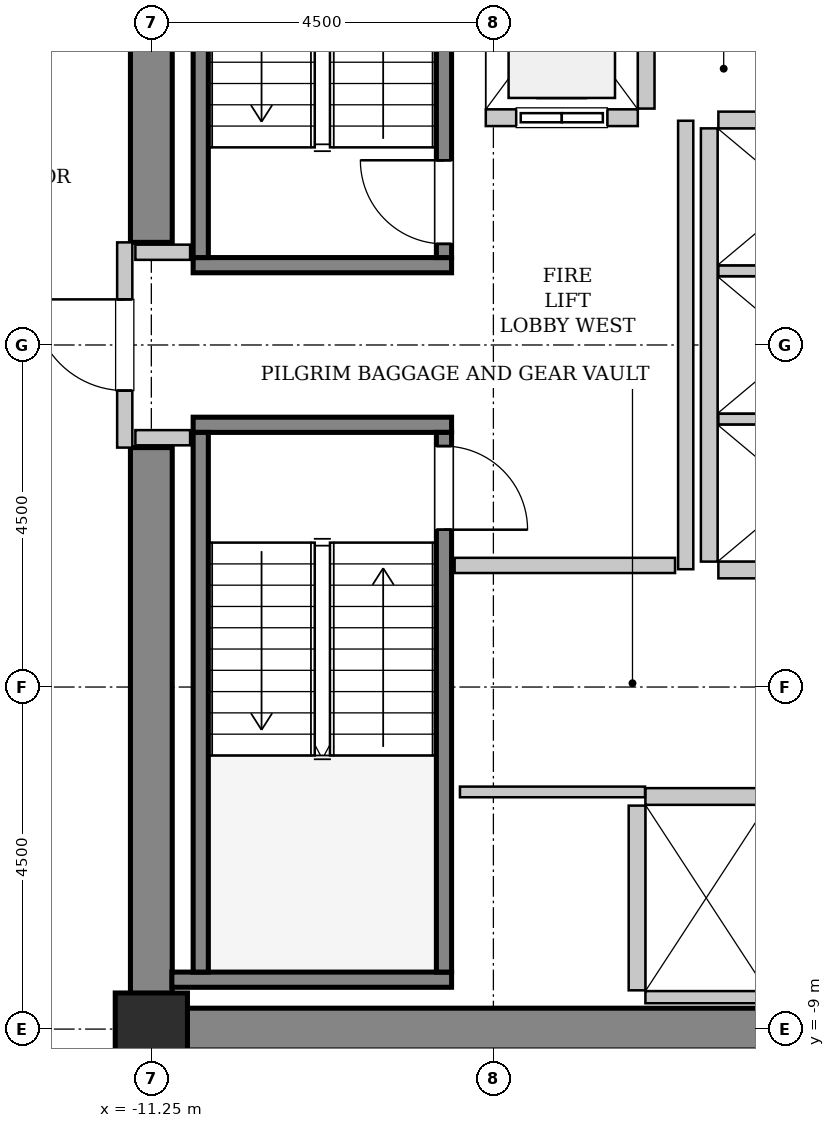
"""IFC4 building model, lengths in metres.
Left out: names, types, materials, properties, quantities, classifications, styles, units other than length and angle.
Written with IfcOpenShell. Run it as: python <this file> out.ifc"""

import sys

from ifc_helpers import new_model, si_unit, direction, frame, frame_2d, origin, origin_2d, place, context, subcontext, project, spatial, rectangle, hollow_rectangle, extrude, source, transform, mapped, element, fill, save


model = new_model("IFC4")
c1 = context("Model", 3, precision=1e-05, world=origin(), true_north=direction((0.0, 1.0)))
c2 = subcontext(c1, "Body", "Model", "MODEL_VIEW")
j1 = project(units=[si_unit("LENGTHUNIT", "METRE"), si_unit("PLANEANGLEUNIT", "RADIAN")], contexts=[c1])
p1 = place(None, origin())
s1 = spatial("IfcSite", under=j1, at=p1, CompositionType="ELEMENT")
p2 = place(p1, origin())
s2 = spatial("IfcBuilding", under=s1, at=p2, CompositionType="ELEMENT")
p3 = place(p2, frame((0.0, 0.0, 132.6)))
s3 = spatial("IfcBuildingStorey", under=s2, at=p3, CompositionType="ELEMENT", Elevation=132.6)
m1 = source(origin(), c2, "Body", "SweptSolid", [
    extrude(rectangle(XDim=9.975, YDim=0.55, at=frame_2d((4.987, 0.0))), origin(), (0.0, 0.0, 1.0), 3.8),
])
p4 = place(p3, frame((-11.525, -9.0, 0.0), z_axis=(0.0, 0.0, 1.0), x_axis=(1.0, 0.0, 0.0)))
e1 = element("IfcWall", 1, at=p4, inside=s3, PredefinedType="SHEAR", context=c2, shape_type="MappedRepresentation", body=[
    mapped(m1, transform((0.0, 0.0, 0.0), x_axis=(1.0, 0.0, 0.0), y_axis=(0.0, 1.0, 0.0), z_axis=(0.0, 0.0, 1.0), scale=1.0)),
])
m2 = source(origin(), c2, "Body", "SweptSolid", [
    extrude(rectangle(XDim=7.375, YDim=0.55, at=frame_2d((3.688, 0.0))), origin(), (0.0, 0.0, 1.0), 3.8),
])
for number, where, z_axis, x_axis in (
    (2, (-11.25, -8.725, 0.0), (0.0, 0.0, 1.0), (0.0, 1.0, 0.0)),
    (3, (-11.25, 1.35, 0.0), (0.0, 0.0, 1.0), (0.0, 1.0, 0.0)),
):
    element("IfcWall", number, at=place(p3, frame(where, z_axis=z_axis, x_axis=x_axis)), inside=s3, PredefinedType="SHEAR", context=c2, shape_type="MappedRepresentation", body=[
        mapped(m2, transform((0.0, 0.0, 0.0), x_axis=(1.0, 0.0, 0.0), y_axis=(0.0, 1.0, 0.0), z_axis=(0.0, 0.0, 1.0), scale=1.0)),
    ])
m3 = source(origin(), c2, "Body", "SweptSolid", [
    extrude(hollow_rectangle(XDim=0.95, YDim=0.95, WallThickness=0.045, InnerFilletRadius=0.045, OuterFilletRadius=0.09, at=origin_2d()), origin(), (0.0, 0.0, 1.0), 3.8),
])
p5 = place(p3, frame((-11.25, -9.0, 0.0), z_axis=(0.0, 0.0, 1.0), x_axis=(1.0, 0.0, 0.0)))
e4 = element("IfcColumn", 4, at=p5, inside=s3, PredefinedType="COLUMN", context=c2, shape_type="MappedRepresentation", body=[
    mapped(m3, transform((0.0, 0.0, 0.0), x_axis=(1.0, 0.0, 0.0), y_axis=(0.0, 1.0, 0.0), z_axis=(0.0, 0.0, 1.0), scale=1.0)),
])
m4 = source(origin(), c2, "Body", "SweptSolid", [
    extrude(rectangle(XDim=3.4, YDim=0.2, at=frame_2d((1.7, 0.0))), origin(), (0.0, 0.0, 1.0), 3.8),
])
p6 = place(p3, frame((-7.3, 1.05, 0.0), z_axis=(0.0, 0.0, 1.0), x_axis=(-1.0, 0.0, 0.0)))
e5 = element("IfcWall", 5, at=p6, inside=s3, PredefinedType="SOLIDWALL", context=c2, shape_type="MappedRepresentation", body=[
    mapped(m4, transform((0.0, 0.0, 0.0), x_axis=(1.0, 0.0, 0.0), y_axis=(0.0, 1.0, 0.0), z_axis=(0.0, 0.0, 1.0), scale=1.0)),
])
m5 = source(origin(), c2, "Body", "SweptSolid", [
    extrude(rectangle(XDim=7.1, YDim=0.2, at=frame_2d((3.55, 0.0))), origin(), (0.0, 0.0, 1.0), 3.8),
])
p7 = place(p3, frame((-7.4, 1.15, 0.0), z_axis=(0.0, 0.0, 1.0), x_axis=(0.0, 1.0, 0.0)))
e6 = element("IfcWall", 6, at=p7, inside=s3, PredefinedType="SOLIDWALL", context=c2, shape_type="MappedRepresentation", body=[
    mapped(m5, transform((0.0, 0.0, 0.0), x_axis=(1.0, 0.0, 0.0), y_axis=(0.0, 1.0, 0.0), z_axis=(0.0, 0.0, 1.0), scale=1.0)),
])
p8 = place(p7, frame((0.18, 0.0, 0.0)))
e7 = element("IfcOpeningElement", 7, at=p8, cuts=e6, PredefinedType="OPENING", context=c2, shape_type="SweptSolid", body=[
    extrude(rectangle(XDim=1.1, YDim=2.15, at=frame_2d((0.55, 1.075))), frame((0.0, 0.11, 0.0), z_axis=(0.0, -1.0, 0.0), x_axis=(1.0, 0.0, 0.0)), (0.0, 0.0, 1.0), 0.22),
])
p9 = place(p3, frame((-10.6, 1.15, 0.0), z_axis=(0.0, 0.0, 1.0), x_axis=(0.0, 1.0, 0.0)))
e8 = element("IfcWall", 8, at=p9, inside=s3, PredefinedType="SOLIDWALL", context=c2, shape_type="MappedRepresentation", body=[
    mapped(m5, transform((0.0, 0.0, 0.0), x_axis=(1.0, 0.0, 0.0), y_axis=(0.0, 1.0, 0.0), z_axis=(0.0, 0.0, 1.0), scale=1.0)),
])
p10 = place(p3, frame((-10.7, -1.05, 0.0), z_axis=(0.0, 0.0, 1.0), x_axis=(1.0, 0.0, 0.0)))
e9 = element("IfcWall", 9, at=p10, inside=s3, PredefinedType="SOLIDWALL", context=c2, shape_type="MappedRepresentation", body=[
    mapped(m4, transform((0.0, 0.0, 0.0), x_axis=(1.0, 0.0, 0.0), y_axis=(0.0, 1.0, 0.0), z_axis=(0.0, 0.0, 1.0), scale=1.0)),
])
m6 = source(origin(), c2, "Body", "SweptSolid", [
    extrude(rectangle(XDim=3.68, YDim=0.2, at=frame_2d((1.84, 0.0))), origin(), (0.0, 0.0, 1.0), 3.8),
])
p11 = place(p3, frame((-10.98, -8.35, 0.0), z_axis=(0.0, 0.0, 1.0), x_axis=(1.0, 0.0, 0.0)))
e10 = element("IfcWall", 10, at=p11, inside=s3, PredefinedType="SOLIDWALL", context=c2, shape_type="MappedRepresentation", body=[
    mapped(m6, transform((0.0, 0.0, 0.0), x_axis=(1.0, 0.0, 0.0), y_axis=(0.0, 1.0, 0.0), z_axis=(0.0, 0.0, 1.0), scale=1.0)),
])
p12 = place(p3, frame((-10.6, -1.15, 0.0), z_axis=(0.0, 0.0, 1.0), x_axis=(0.0, -1.0, 0.0)))
e11 = element("IfcWall", 11, at=p12, inside=s3, PredefinedType="SOLIDWALL", context=c2, shape_type="MappedRepresentation", body=[
    mapped(m5, transform((0.0, 0.0, 0.0), x_axis=(1.0, 0.0, 0.0), y_axis=(0.0, 1.0, 0.0), z_axis=(0.0, 0.0, 1.0), scale=1.0)),
])
p13 = place(p3, frame((-7.4, -1.15, 0.0), z_axis=(0.0, 0.0, 1.0), x_axis=(0.0, -1.0, 0.0)))
e12 = element("IfcWall", 12, at=p13, inside=s3, PredefinedType="SOLIDWALL", context=c2, shape_type="MappedRepresentation", body=[
    mapped(m5, transform((0.0, 0.0, 0.0), x_axis=(1.0, 0.0, 0.0), y_axis=(0.0, 1.0, 0.0), z_axis=(0.0, 0.0, 1.0), scale=1.0)),
])
p14 = place(p13, frame((0.18, 0.0, 0.0)))
e13 = element("IfcOpeningElement", 13, at=p14, cuts=e12, PredefinedType="OPENING", context=c2, shape_type="SweptSolid", body=[
    extrude(rectangle(XDim=1.1, YDim=2.15, at=frame_2d((0.55, 1.075))), frame((0.0, 0.11, 0.0), z_axis=(0.0, -1.0, 0.0), x_axis=(1.0, 0.0, 0.0)), (0.0, 0.0, 1.0), 0.22),
])
m7 = source(origin(), c2, "Body", "SweptSolid", [
    extrude(rectangle(XDim=2.0, YDim=0.22, at=frame_2d((1.0, 0.0))), origin(), (0.0, 0.0, 1.0), 3.535),
])
p15 = place(p3, frame((-6.85, 2.99, 0.0), z_axis=(0.0, 0.0, 1.0), x_axis=(1.0, 0.0, 0.0)))
e14 = element("IfcWall", 14, at=p15, inside=s3, PredefinedType="SOLIDWALL", context=c2, shape_type="MappedRepresentation", body=[
    mapped(m7, transform((0.0, 0.0, 0.0), x_axis=(1.0, 0.0, 0.0), y_axis=(0.0, 1.0, 0.0), z_axis=(0.0, 0.0, 1.0), scale=1.0)),
])
p16 = place(p15, frame((0.4, 0.0, 0.0)))
e15 = element("IfcOpeningElement", 15, at=p16, cuts=e14, PredefinedType="OPENING", context=c2, shape_type="SweptSolid", body=[
    extrude(rectangle(XDim=1.2, YDim=2.2, at=frame_2d((0.6, 1.1))), frame((0.0, 0.12, 0.0), z_axis=(0.0, -1.0, 0.0), x_axis=(1.0, 0.0, 0.0)), (0.0, 0.0, 1.0), 0.24),
])
m8 = source(origin(), c2, "Body", "SweptSolid", [
    extrude(rectangle(XDim=2.68, YDim=0.22, at=frame_2d((1.34, 0.0))), origin(), (0.0, 0.0, 1.0), 3.535),
])
p17 = place(p3, frame((-4.74, 3.11, 0.0), z_axis=(0.0, 0.0, 1.0), x_axis=(0.0, 1.0, 0.0)))
e16 = element("IfcWall", 16, at=p17, inside=s3, PredefinedType="SOLIDWALL", context=c2, shape_type="MappedRepresentation", body=[
    mapped(m8, transform((0.0, 0.0, 0.0), x_axis=(1.0, 0.0, 0.0), y_axis=(0.0, 1.0, 0.0), z_axis=(0.0, 0.0, 1.0), scale=1.0)),
])
m9 = source(origin(), c2, "Body", "SweptSolid", [
    extrude(rectangle(XDim=3.2, YDim=0.22, at=frame_2d((1.6, 0.0))), origin(), (0.0, 0.0, 1.0), 3.535),
])
p18 = place(p3, frame((-1.55, -5.94, 0.0), z_axis=(0.0, 0.0, 1.0), x_axis=(-1.0, 0.0, 0.0)))
e17 = element("IfcWall", 17, at=p18, inside=s3, PredefinedType="SOLIDWALL", context=c2, shape_type="MappedRepresentation", body=[
    mapped(m9, transform((0.0, 0.0, 0.0), x_axis=(1.0, 0.0, 0.0), y_axis=(0.0, 1.0, 0.0), z_axis=(0.0, 0.0, 1.0), scale=1.0)),
])
m10 = source(origin(), c2, "Body", "SweptSolid", [
    extrude(rectangle(XDim=3.2, YDim=0.16, at=frame_2d((1.6, 0.0))), origin(), (0.0, 0.0, 1.0), 2.425),
])
p19 = place(p3, frame((-4.75, -8.58, 0.0), z_axis=(0.0, 0.0, 1.0), x_axis=(1.0, 0.0, 0.0)))
e18 = element("IfcWall", 18, at=p19, inside=s3, PredefinedType="PARTITIONING", context=c2, shape_type="MappedRepresentation", body=[
    mapped(m10, transform((0.0, 0.0, 0.0), x_axis=(1.0, 0.0, 0.0), y_axis=(0.0, 1.0, 0.0), z_axis=(0.0, 0.0, 1.0), scale=1.0)),
])
m11 = source(origin(), c2, "Body", "SweptSolid", [
    extrude(rectangle(XDim=2.43, YDim=0.22, at=frame_2d((1.215, 0.0))), origin(), (0.0, 0.0, 1.0), 3.535),
])
p20 = place(p3, frame((-4.86, -6.06, 0.0), z_axis=(0.0, 0.0, 1.0), x_axis=(0.0, -1.0, 0.0)))
e19 = element("IfcWall", 19, at=p20, inside=s3, PredefinedType="SOLIDWALL", context=c2, shape_type="MappedRepresentation", body=[
    mapped(m11, transform((0.0, 0.0, 0.0), x_axis=(1.0, 0.0, 0.0), y_axis=(0.0, 1.0, 0.0), z_axis=(0.0, 0.0, 1.0), scale=1.0)),
])
m12 = source(origin(), c2, "Body", "SweptSolid", [
    extrude(rectangle(XDim=5.7, YDim=0.22, at=frame_2d((2.85, 0.0))), origin(), (0.0, 0.0, 1.0), 3.535),
])
p21 = place(p3, frame((-3.91, 2.85, 0.0), z_axis=(0.0, 0.0, 1.0), x_axis=(0.0, -1.0, 0.0)))
e20 = element("IfcWall", 20, at=p21, inside=s3, PredefinedType="SOLIDWALL", context=c2, shape_type="MappedRepresentation", body=[
    mapped(m12, transform((0.0, 0.0, 0.0), x_axis=(1.0, 0.0, 0.0), y_axis=(0.0, 1.0, 0.0), z_axis=(0.0, 0.0, 1.0), scale=1.0)),
])
m13 = source(origin(), c2, "Body", "SweptSolid", [
    extrude(rectangle(XDim=2.13, YDim=0.22, at=frame_2d((1.065, 0.0))), origin(), (0.0, 0.0, 1.0), 3.535),
])
p22 = place(p3, frame((-3.79, -2.96, 0.0), z_axis=(0.0, 0.0, 1.0), x_axis=(1.0, 0.0, 0.0)))
e21 = element("IfcWall", 21, at=p22, inside=s3, PredefinedType="SOLIDWALL", context=c2, shape_type="MappedRepresentation", body=[
    mapped(m13, transform((0.0, 0.0, 0.0), x_axis=(1.0, 0.0, 0.0), y_axis=(0.0, 1.0, 0.0), z_axis=(0.0, 0.0, 1.0), scale=1.0)),
])
m14 = source(origin(), c2, "Body", "SweptSolid", [
    extrude(rectangle(XDim=2.13, YDim=0.14, at=frame_2d((1.065, 0.0))), origin(), (0.0, 0.0, 1.0), 3.535),
])
for number, where, z_axis, x_axis in (
    (22, (-3.79, -0.975, 0.0), (0.0, 0.0, 1.0), (1.0, 0.0, 0.0)),
    (23, (-3.79, 0.975, 0.0), (0.0, 0.0, 1.0), (1.0, 0.0, 0.0)),
):
    element("IfcWall", number, at=place(p3, frame(where, z_axis=z_axis, x_axis=x_axis)), inside=s3, PredefinedType="PARTITIONING", context=c2, shape_type="MappedRepresentation", body=[
        mapped(m14, transform((0.0, 0.0, 0.0), x_axis=(1.0, 0.0, 0.0), y_axis=(0.0, 1.0, 0.0), z_axis=(0.0, 0.0, 1.0), scale=1.0)),
    ])
p23 = place(p3, frame((-1.66, 2.96, 0.0), z_axis=(0.0, 0.0, 1.0), x_axis=(-1.0, 0.0, 0.0)))
e24 = element("IfcWall", 24, at=p23, inside=s3, PredefinedType="SOLIDWALL", context=c2, shape_type="MappedRepresentation", body=[
    mapped(m13, transform((0.0, 0.0, 0.0), x_axis=(1.0, 0.0, 0.0), y_axis=(0.0, 1.0, 0.0), z_axis=(0.0, 0.0, 1.0), scale=1.0)),
])
m15 = source(origin(), c2, "Body", "SweptSolid", [
    extrude(rectangle(XDim=2.7, YDim=0.2, at=frame_2d((1.35, 0.0))), origin(), (0.0, 0.0, 1.0), 2.425),
])
p24 = place(p3, frame((-11.6, -1.35, 0.0), z_axis=(0.0, 0.0, 1.0), x_axis=(0.0, 1.0, 0.0)))
e25 = element("IfcWall", 25, at=p24, inside=s3, PredefinedType="PARTITIONING", context=c2, shape_type="MappedRepresentation", body=[
    mapped(m15, transform((0.0, 0.0, 0.0), x_axis=(1.0, 0.0, 0.0), y_axis=(0.0, 1.0, 0.0), z_axis=(0.0, 0.0, 1.0), scale=1.0)),
])
p25 = place(p24, frame((0.75, 0.0, 0.0)))
e26 = element("IfcOpeningElement", 26, at=p25, cuts=e25, PredefinedType="OPENING", context=c2, shape_type="SweptSolid", body=[
    extrude(rectangle(XDim=1.2, YDim=2.15, at=frame_2d((0.6, 1.075))), frame((0.0, 0.11, 0.0), z_axis=(0.0, -1.0, 0.0), x_axis=(1.0, 0.0, 0.0)), (0.0, 0.0, 1.0), 0.22),
])
m16 = source(origin(), c2, "Body", "SweptSolid", [
    extrude(rectangle(XDim=5.9, YDim=0.2, at=frame_2d((2.95, 0.0))), origin(), (0.0, 0.0, 1.0), 3.535),
])
p26 = place(p3, frame((-4.22, -2.95, 0.0), z_axis=(0.0, 0.0, 1.0), x_axis=(0.0, 1.0, 0.0)))
e27 = element("IfcWall", 27, at=p26, inside=s3, PredefinedType="PARTITIONING", context=c2, shape_type="MappedRepresentation", body=[
    mapped(m16, transform((0.0, 0.0, 0.0), x_axis=(1.0, 0.0, 0.0), y_axis=(0.0, 1.0, 0.0), z_axis=(0.0, 0.0, 1.0), scale=1.0)),
])
m17 = source(origin(), c2, "Body", "SweptSolid", [
    extrude(rectangle(XDim=2.9, YDim=0.2, at=frame_2d((1.45, 0.0))), origin(), (0.0, 0.0, 1.0), 3.535),
])
p27 = place(p3, frame((-7.26, -2.9, 0.0), z_axis=(0.0, 0.0, 1.0), x_axis=(1.0, 0.0, 0.0)))
e28 = element("IfcWall", 28, at=p27, inside=s3, PredefinedType="PARTITIONING", context=c2, shape_type="MappedRepresentation", body=[
    mapped(m17, transform((0.0, 0.0, 0.0), x_axis=(1.0, 0.0, 0.0), y_axis=(0.0, 1.0, 0.0), z_axis=(0.0, 0.0, 1.0), scale=1.0)),
])
m18 = source(origin(), c2, "Body", "SweptSolid", [
    extrude(rectangle(XDim=0.72, YDim=0.2, at=frame_2d((0.36, 0.0))), origin(), (0.0, 0.0, 1.0), 3.535),
])
for number, where, z_axis, x_axis in (
    (29, (-11.46, 1.22, 0.0), (0.0, 0.0, 1.0), (1.0, 0.0, 0.0)),
    (30, (-11.46, -1.22, 0.0), (0.0, 0.0, 1.0), (1.0, 0.0, 0.0)),
):
    element("IfcWall", number, at=place(p3, frame(where, z_axis=z_axis, x_axis=x_axis)), inside=s3, PredefinedType="PARTITIONING", context=c2, shape_type="MappedRepresentation", body=[
        mapped(m18, transform((0.0, 0.0, 0.0), x_axis=(1.0, 0.0, 0.0), y_axis=(0.0, 1.0, 0.0), z_axis=(0.0, 0.0, 1.0), scale=1.0)),
    ])
m19 = source(origin(), c2, "Body", "SweptSolid", [
    extrude(rectangle(XDim=2.435, YDim=0.14, at=frame_2d((1.218, 0.0))), origin(), (0.0, 0.0, 1.0), 3.535),
])
p28 = place(p3, frame((-7.19, -5.88, 0.0), z_axis=(0.0, 0.0, 1.0), x_axis=(1.0, 0.0, 0.0)))
e31 = element("IfcWall", 31, at=p28, inside=s3, PredefinedType="PARTITIONING", context=c2, shape_type="MappedRepresentation", body=[
    mapped(m19, transform((0.0, 0.0, 0.0), x_axis=(1.0, 0.0, 0.0), y_axis=(0.0, 1.0, 0.0), z_axis=(0.0, 0.0, 1.0), scale=1.0)),
])
m20 = source(origin(), c2, "Body", "SweptSolid", [
    extrude(rectangle(XDim=1.1, YDim=2.15, at=frame_2d((0.55, 1.075))), frame((0.0, 0.025, 0.0), z_axis=(0.0, -1.0, 0.0), x_axis=(1.0, 0.0, 0.0)), (0.0, 0.0, 1.0), 0.05),
])
p29 = place(p8, origin())
e32 = element("IfcDoor", 32, at=p29, inside=s3, OperationType="SINGLE_SWING_RIGHT", PredefinedType="DOOR", context=c2, shape_type="MappedRepresentation", body=[
    mapped(m20, transform((0.0, 0.0, 0.0), x_axis=(1.0, 0.0, 0.0), y_axis=(0.0, 1.0, 0.0), z_axis=(0.0, 0.0, 1.0), scale=1.0)),
])
fill(e7, e32)
p30 = place(p14, origin())
e33 = element("IfcDoor", 33, at=p30, inside=s3, OperationType="SINGLE_SWING_RIGHT", PredefinedType="DOOR", context=c2, shape_type="MappedRepresentation", body=[
    mapped(m20, transform((0.0, 0.0, 0.0), x_axis=(1.0, 0.0, 0.0), y_axis=(0.0, 1.0, 0.0), z_axis=(0.0, 0.0, 1.0), scale=1.0)),
])
fill(e13, e33)
m21 = source(origin(), c2, "Body", "SweptSolid", [
    extrude(rectangle(XDim=1.2, YDim=2.2, at=frame_2d((0.6, 1.1))), frame((0.0, 0.025, 0.0), z_axis=(0.0, -1.0, 0.0), x_axis=(1.0, 0.0, 0.0)), (0.0, 0.0, 1.0), 0.05),
])
p31 = place(p16, origin())
e34 = element("IfcDoor", 34, at=p31, inside=s3, OperationType="SLIDING_TO_LEFT", PredefinedType="DOOR", context=c2, shape_type="MappedRepresentation", body=[
    mapped(m21, transform((0.0, 0.0, 0.0), x_axis=(1.0, 0.0, 0.0), y_axis=(0.0, 1.0, 0.0), z_axis=(0.0, 0.0, 1.0), scale=1.0)),
])
fill(e15, e34)
m22 = source(origin(), c2, "Body", "SweptSolid", [
    extrude(rectangle(XDim=1.2, YDim=2.15, at=frame_2d((0.6, 1.075))), frame((0.0, 0.025, 0.0), z_axis=(0.0, -1.0, 0.0), x_axis=(1.0, 0.0, 0.0)), (0.0, 0.0, 1.0), 0.05),
])
p32 = place(p25, origin())
e35 = element("IfcDoor", 35, at=p32, inside=s3, OperationType="SINGLE_SWING_RIGHT", PredefinedType="DOOR", context=c2, shape_type="MappedRepresentation", body=[
    mapped(m22, transform((0.0, 0.0, 0.0), x_axis=(1.0, 0.0, 0.0), y_axis=(0.0, 1.0, 0.0), z_axis=(0.0, 0.0, 1.0), scale=1.0)),
])
fill(e26, e35)
save(model, sys.argv[1])
